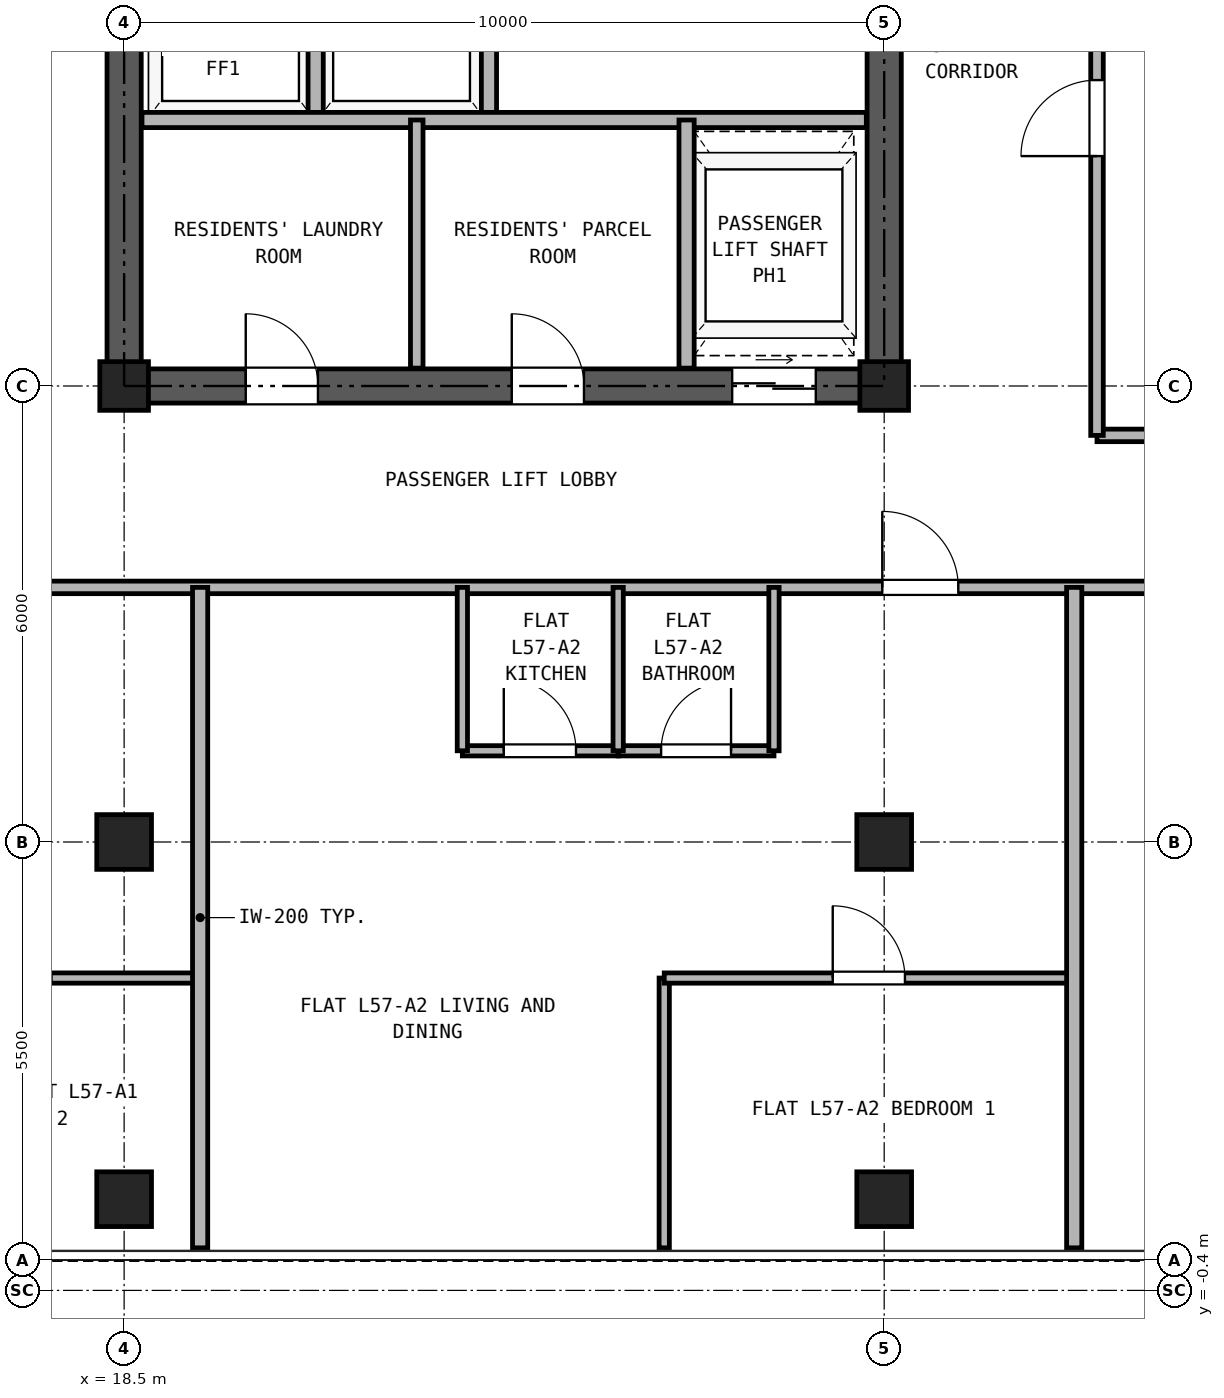
"""IFC4 building model, lengths in metres.
Left out: names, types, materials, properties, quantities, classifications, styles, units other than length and angle.
Written with IfcOpenShell. Run it as: python <this file> out.ifc"""

import sys

from ifc_helpers import new_model, si_unit, direction, frame, frame_2d, origin, origin_2d, place, context, subcontext, project, spatial, rectangle, hollow_rectangle, extrude, source, transform, mapped, element, fill, save


model = new_model("IFC4")
c1 = context("Model", 3, precision=1e-05, world=origin(), true_north=direction((0.0, 1.0)))
c2 = subcontext(c1, "Body", "Model", "MODEL_VIEW")
j1 = project(units=[si_unit("LENGTHUNIT", "METRE"), si_unit("PLANEANGLEUNIT", "RADIAN")], contexts=[c1])
p1 = place(None, origin())
s1 = spatial("IfcSite", under=j1, at=p1, CompositionType="ELEMENT")
p2 = place(p1, origin())
s2 = spatial("IfcBuilding", under=s1, at=p2, CompositionType="ELEMENT")
p3 = place(p2, frame((0.0, 0.0, 202.8)))
s3 = spatial("IfcBuildingStorey", under=s2, at=p3, CompositionType="ELEMENT", Elevation=202.8)
m1 = source(origin(), c2, "Body", "SweptSolid", [
    extrude(hollow_rectangle(XDim=0.72, YDim=0.72, WallThickness=0.04, at=origin_2d()), origin(), (0.0, 0.0, 1.0), 2.95),
])
for number, where, z_axis, x_axis in (
    (1, (18.5, 0.8, 0.0), (0.0, 0.0, 1.0), (1.0, 0.0, 0.0)),
    (2, (28.5, 0.8, 0.0), (0.0, 0.0, 1.0), (1.0, 0.0, 0.0)),
    (3, (18.5, 5.5, 0.0), (0.0, 0.0, 1.0), (1.0, 0.0, 0.0)),
):
    element("IfcColumn", number, at=place(p3, frame(where, z_axis=z_axis, x_axis=x_axis)), inside=s3, PredefinedType="COLUMN", context=c2, shape_type="MappedRepresentation", body=[
        mapped(m1, transform((0.0, 0.0, 0.0), x_axis=(1.0, 0.0, 0.0), y_axis=(0.0, 1.0, 0.0), z_axis=(0.0, 0.0, 1.0), scale=1.0)),
    ])
m2 = source(origin(), c2, "Body", "SweptSolid", [
    extrude(hollow_rectangle(XDim=0.64, YDim=0.64, WallThickness=0.035, at=origin_2d()), origin(), (0.0, 0.0, 1.0), 2.95),
])
p4 = place(p3, frame((18.5, 11.5, 0.0), z_axis=(0.0, 0.0, 1.0), x_axis=(1.0, 0.0, 0.0)))
e4 = element("IfcColumn", 4, at=p4, inside=s3, PredefinedType="COLUMN", context=c2, shape_type="MappedRepresentation", body=[
    mapped(m2, transform((0.0, 0.0, 0.0), x_axis=(1.0, 0.0, 0.0), y_axis=(0.0, 1.0, 0.0), z_axis=(0.0, 0.0, 1.0), scale=1.0)),
])
p5 = place(p3, frame((28.5, 5.5, 0.0), z_axis=(0.0, 0.0, 1.0), x_axis=(1.0, 0.0, 0.0)))
e5 = element("IfcColumn", 5, at=p5, inside=s3, PredefinedType="COLUMN", context=c2, shape_type="MappedRepresentation", body=[
    mapped(m1, transform((0.0, 0.0, 0.0), x_axis=(1.0, 0.0, 0.0), y_axis=(0.0, 1.0, 0.0), z_axis=(0.0, 0.0, 1.0), scale=1.0)),
])
p6 = place(p3, frame((28.5, 11.5, 0.0), z_axis=(0.0, 0.0, 1.0), x_axis=(1.0, 0.0, 0.0)))
e6 = element("IfcColumn", 6, at=p6, inside=s3, PredefinedType="COLUMN", context=c2, shape_type="MappedRepresentation", body=[
    mapped(m2, transform((0.0, 0.0, 0.0), x_axis=(1.0, 0.0, 0.0), y_axis=(0.0, 1.0, 0.0), z_axis=(0.0, 0.0, 1.0), scale=1.0)),
])
p7 = place(p3, frame((18.275, 11.5, 0.0), z_axis=(0.0, 0.0, 1.0), x_axis=(1.0, 0.0, 0.0)))
e7 = element("IfcWall", 7, at=p7, inside=s3, PredefinedType="SHEAR", context=c2, shape_type="SweptSolid", body=[
    extrude(rectangle(XDim=10.45, YDim=0.45, at=frame_2d((5.225, 0.0))), origin(), (0.0, 0.0, 1.0), 2.95),
])
p8 = place(p7, frame((1.825, 0.0, 0.0)))
e8 = element("IfcOpeningElement", 8, at=p8, cuts=e7, PredefinedType="OPENING", context=c2, shape_type="SweptSolid", body=[
    extrude(rectangle(XDim=0.95, YDim=2.15, at=frame_2d((0.475, 1.075))), frame((0.0, 0.235, 0.0), z_axis=(0.0, -1.0, 0.0), x_axis=(1.0, 0.0, 0.0)), (0.0, 0.0, 1.0), 0.47),
])
p9 = place(p7, frame((5.325, 0.0, 0.0)))
e9 = element("IfcOpeningElement", 9, at=p9, cuts=e7, PredefinedType="OPENING", context=c2, shape_type="SweptSolid", body=[
    extrude(rectangle(XDim=0.95, YDim=2.15, at=frame_2d((0.475, 1.075))), frame((0.0, 0.235, 0.0), z_axis=(0.0, -1.0, 0.0), x_axis=(1.0, 0.0, 0.0)), (0.0, 0.0, 1.0), 0.47),
])
p10 = place(p7, frame((8.225, 0.0, 0.0)))
e10 = element("IfcOpeningElement", 10, at=p10, cuts=e7, PredefinedType="OPENING", context=c2, shape_type="SweptSolid", body=[
    extrude(rectangle(XDim=1.1, YDim=2.25, at=frame_2d((0.55, 1.125))), frame((0.0, 0.235, 0.0), z_axis=(0.0, -1.0, 0.0), x_axis=(1.0, 0.0, 0.0)), (0.0, 0.0, 1.0), 0.47),
])
p11 = place(p3, frame((18.5, 11.725, 0.0), z_axis=(0.0, 0.0, 1.0), x_axis=(0.0, 1.0, 0.0)))
e11 = element("IfcWall", 11, at=p11, inside=s3, PredefinedType="SHEAR", context=c2, shape_type="SweptSolid", body=[
    extrude(rectangle(XDim=16.8, YDim=0.45, at=frame_2d((8.4, 0.0))), origin(), (0.0, 0.0, 1.0), 2.95),
])
p12 = place(p11, frame((7.425, 0.0, 0.0)))
e12 = element("IfcOpeningElement", 12, at=p12, cuts=e11, PredefinedType="OPENING", context=c2, shape_type="SweptSolid", body=[
    extrude(rectangle(XDim=1.15, YDim=2.2, at=frame_2d((0.575, 1.1))), frame((0.0, 0.235, 0.0), z_axis=(0.0, -1.0, 0.0), x_axis=(1.0, 0.0, 0.0)), (0.0, 0.0, 1.0), 0.47),
])
p13 = place(p3, frame((28.5, 11.725, 0.0), z_axis=(0.0, 0.0, 1.0), x_axis=(0.0, 1.0, 0.0)))
e13 = element("IfcWall", 13, at=p13, inside=s3, PredefinedType="SHEAR", context=c2, shape_type="SweptSolid", body=[
    extrude(rectangle(XDim=16.8, YDim=0.45, at=frame_2d((8.4, 0.0))), origin(), (0.0, 0.0, 1.0), 2.95),
])
p14 = place(p13, frame((7.425, 0.0, 0.0)))
e14 = element("IfcOpeningElement", 14, at=p14, cuts=e13, PredefinedType="OPENING", context=c2, shape_type="SweptSolid", body=[
    extrude(rectangle(XDim=1.15, YDim=2.2, at=frame_2d((0.575, 1.1))), frame((0.0, 0.235, 0.0), z_axis=(0.0, -1.0, 0.0), x_axis=(1.0, 0.0, 0.0)), (0.0, 0.0, 1.0), 0.47),
])
for number, where, z_axis, x_axis in (
    (15, (21.02, 15.0, 0.0), (0.0, 0.0, 1.0), (0.0, 1.0, 0.0)),
    (16, (23.3, 15.0, 0.0), (0.0, 0.0, 1.0), (0.0, 1.0, 0.0)),
):
    element("IfcWall", number, at=place(p3, frame(where, z_axis=z_axis, x_axis=x_axis)), inside=s3, PredefinedType="PARTITIONING", context=c2, shape_type="SweptSolid", body=[
        extrude(rectangle(XDim=3.0, YDim=0.2, at=frame_2d((1.5, 0.0))), origin(), (0.0, 0.0, 1.0), 2.95),
    ])
p15 = place(p3, frame((18.735, 15.0, 0.0), z_axis=(0.0, 0.0, 1.0), x_axis=(1.0, 0.0, 0.0)))
e17 = element("IfcWall", 17, at=p15, inside=s3, PredefinedType="PARTITIONING", context=c2, shape_type="SweptSolid", body=[
    extrude(rectangle(XDim=9.53, YDim=0.2, at=frame_2d((4.765, 0.0))), origin(), (0.0, 0.0, 1.0), 2.95),
])
p16 = place(p3, frame((22.35, 11.735, 0.0), z_axis=(0.0, 0.0, 1.0), x_axis=(0.0, 1.0, 0.0)))
e18 = element("IfcWall", 18, at=p16, inside=s3, PredefinedType="PARTITIONING", context=c2, shape_type="SweptSolid", body=[
    extrude(rectangle(XDim=3.265, YDim=0.165, at=frame_2d((1.632, 0.0))), origin(), (0.0, 0.0, 1.0), 2.95),
])
p17 = place(p3, frame((25.9, 11.735, 0.0), z_axis=(0.0, 0.0, 1.0), x_axis=(0.0, 1.0, 0.0)))
e19 = element("IfcWall", 19, at=p17, inside=s3, PredefinedType="PARTITIONING", context=c2, shape_type="SweptSolid", body=[
    extrude(rectangle(XDim=3.265, YDim=0.2, at=frame_2d((1.632, 0.0))), origin(), (0.0, 0.0, 1.0), 2.95),
])
p18 = place(p3, frame((0.16, 8.85, 0.0), z_axis=(0.0, 0.0, 1.0), x_axis=(1.0, 0.0, 0.0)))
e20 = element("IfcWall", 20, at=p18, inside=s3, PredefinedType="PARTITIONING", context=c2, shape_type="SweptSolid", body=[
    extrude(rectangle(XDim=41.48, YDim=0.165, at=frame_2d((20.74, 0.0))), origin(), (0.0, 0.0, 1.0), 2.95),
])
p19 = place(p18, frame((14.815, 0.0, 0.0)))
e21 = element("IfcOpeningElement", 21, at=p19, cuts=e20, PredefinedType="OPENING", context=c2, shape_type="SweptSolid", body=[
    extrude(rectangle(XDim=1.0, YDim=2.15, at=frame_2d((0.5, 1.075))), frame((0.0, 0.093, 0.0), z_axis=(0.0, -1.0, 0.0), x_axis=(1.0, 0.0, 0.0)), (0.0, 0.0, 1.0), 0.185),
])
p20 = place(p18, frame((28.315, 0.0, 0.0)))
e22 = element("IfcOpeningElement", 22, at=p20, cuts=e20, PredefinedType="OPENING", context=c2, shape_type="SweptSolid", body=[
    extrude(rectangle(XDim=1.0, YDim=2.15, at=frame_2d((0.5, 1.075))), frame((0.0, 0.093, 0.0), z_axis=(0.0, -1.0, 0.0), x_axis=(1.0, 0.0, 0.0)), (0.0, 0.0, 1.0), 0.185),
])
p21 = place(p18, frame((32.615, 0.0, 0.0)))
e23 = element("IfcOpeningElement", 23, at=p21, cuts=e20, PredefinedType="OPENING", context=c2, shape_type="SweptSolid", body=[
    extrude(rectangle(XDim=1.0, YDim=2.15, at=frame_2d((0.5, 1.075))), frame((0.0, 0.093, 0.0), z_axis=(0.0, -1.0, 0.0), x_axis=(1.0, 0.0, 0.0)), (0.0, 0.0, 1.0), 0.185),
])
p22 = place(p3, frame((31.3, 10.85, 0.0), z_axis=(0.0, 0.0, 1.0), x_axis=(1.0, 0.0, 0.0)))
e24 = element("IfcWall", 24, at=p22, inside=s3, PredefinedType="PARTITIONING", context=c2, shape_type="SweptSolid", body=[
    extrude(rectangle(XDim=6.9, YDim=0.165, at=frame_2d((3.45, 0.0))), origin(), (0.0, 0.0, 1.0), 2.95),
])
p23 = place(p3, frame((31.3, 10.85, 0.0), z_axis=(0.0, 0.0, 1.0), x_axis=(0.0, 1.0, 0.0)))
e25 = element("IfcWall", 25, at=p23, inside=s3, PredefinedType="PARTITIONING", context=c2, shape_type="SweptSolid", body=[
    extrude(rectangle(XDim=24.29, YDim=0.165, at=frame_2d((12.145, 0.0))), origin(), (0.0, 0.0, 1.0), 2.95),
])
p24 = place(p23, frame((3.675, 0.0, 0.0)))
e26 = element("IfcOpeningElement", 26, at=p24, cuts=e25, PredefinedType="OPENING", context=c2, shape_type="SweptSolid", body=[
    extrude(rectangle(XDim=1.0, YDim=2.15, at=frame_2d((0.5, 1.075))), frame((0.0, 0.093, 0.0), z_axis=(0.0, -1.0, 0.0), x_axis=(1.0, 0.0, 0.0)), (0.0, 0.0, 1.0), 0.185),
])
p25 = place(p23, frame((11.95, 0.0, 0.0)))
e27 = element("IfcOpeningElement", 27, at=p25, cuts=e25, PredefinedType="OPENING", context=c2, shape_type="SweptSolid", body=[
    extrude(rectangle(XDim=1.0, YDim=2.15, at=frame_2d((0.5, 1.075))), frame((0.0, 0.093, 0.0), z_axis=(0.0, -1.0, 0.0), x_axis=(1.0, 0.0, 0.0)), (0.0, 0.0, 1.0), 0.185),
])
p26 = place(p23, frame((17.75, 0.0, 0.0)))
e28 = element("IfcOpeningElement", 28, at=p26, cuts=e25, PredefinedType="OPENING", context=c2, shape_type="SweptSolid", body=[
    extrude(rectangle(XDim=1.0, YDim=2.15, at=frame_2d((0.5, 1.075))), frame((0.0, 0.093, 0.0), z_axis=(0.0, -1.0, 0.0), x_axis=(1.0, 0.0, 0.0)), (0.0, 0.0, 1.0), 0.185),
])
p27 = place(p3, frame((14.648, 3.71, 0.0), z_axis=(0.0, 0.0, 1.0), x_axis=(1.0, 0.0, 0.0)))
e29 = element("IfcWall", 29, at=p27, inside=s3, PredefinedType="PARTITIONING", context=c2, shape_type="SweptSolid", body=[
    extrude(rectangle(XDim=4.852, YDim=0.135, at=frame_2d((2.426, 0.0))), origin(), (0.0, 0.0, 1.0), 2.95),
])
p28 = place(p27, frame((1.946, 0.0, 0.0)))
e30 = element("IfcOpeningElement", 30, at=p28, cuts=e29, PredefinedType="OPENING", context=c2, shape_type="SweptSolid", body=[
    extrude(rectangle(XDim=0.95, YDim=2.15, at=frame_2d((0.475, 1.075))), frame((0.0, 0.077, 0.0), z_axis=(0.0, -1.0, 0.0), x_axis=(1.0, 0.0, 0.0)), (0.0, 0.0, 1.0), 0.155),
])
p29 = place(p3, frame((19.5, 0.16, 0.0), z_axis=(0.0, 0.0, 1.0), x_axis=(0.0, 1.0, 0.0)))
e31 = element("IfcWall", 31, at=p29, inside=s3, PredefinedType="PARTITIONING", context=c2, shape_type="SweptSolid", body=[
    extrude(rectangle(XDim=8.69, YDim=0.2, at=frame_2d((4.345, 0.0))), origin(), (0.0, 0.0, 1.0), 2.95),
])
p30 = place(p3, frame((22.95, 6.7, 0.0), z_axis=(0.0, 0.0, 1.0), x_axis=(1.0, 0.0, 0.0)))
e32 = element("IfcWall", 32, at=p30, inside=s3, PredefinedType="PARTITIONING", context=c2, shape_type="SweptSolid", body=[
    extrude(rectangle(XDim=2.05, YDim=0.135, at=frame_2d((1.025, 0.0))), origin(), (0.0, 0.0, 1.0), 2.95),
])
p31 = place(p30, frame((0.545, 0.0, 0.0)))
e33 = element("IfcOpeningElement", 33, at=p31, cuts=e32, PredefinedType="OPENING", context=c2, shape_type="SweptSolid", body=[
    extrude(rectangle(XDim=0.95, YDim=2.15, at=frame_2d((0.475, 1.075))), frame((0.0, 0.077, 0.0), z_axis=(0.0, -1.0, 0.0), x_axis=(1.0, 0.0, 0.0)), (0.0, 0.0, 1.0), 0.155),
])
p32 = place(p3, frame((25.0, 6.7, 0.0), z_axis=(0.0, 0.0, 1.0), x_axis=(1.0, 0.0, 0.0)))
e34 = element("IfcWall", 34, at=p32, inside=s3, PredefinedType="PARTITIONING", context=c2, shape_type="SweptSolid", body=[
    extrude(rectangle(XDim=2.05, YDim=0.135, at=frame_2d((1.025, 0.0))), origin(), (0.0, 0.0, 1.0), 2.95),
])
p33 = place(p32, frame((0.565, 0.0, 0.0)))
e35 = element("IfcOpeningElement", 35, at=p33, cuts=e34, PredefinedType="OPENING", context=c2, shape_type="SweptSolid", body=[
    extrude(rectangle(XDim=0.92, YDim=2.1, at=frame_2d((0.46, 1.05))), frame((0.0, 0.077, 0.0), z_axis=(0.0, -1.0, 0.0), x_axis=(1.0, 0.0, 0.0)), (0.0, 0.0, 1.0), 0.155),
])
for number, where, z_axis, x_axis in (
    (36, (22.95, 6.7, 0.0), (0.0, 0.0, 1.0), (0.0, 1.0, 0.0)),
    (37, (25.0, 6.7, 0.0), (0.0, 0.0, 1.0), (0.0, 1.0, 0.0)),
    (38, (27.05, 6.7, 0.0), (0.0, 0.0, 1.0), (0.0, 1.0, 0.0)),
):
    element("IfcWall", number, at=place(p3, frame(where, z_axis=z_axis, x_axis=x_axis)), inside=s3, PredefinedType="PARTITIONING", context=c2, shape_type="SweptSolid", body=[
        extrude(rectangle(XDim=2.15, YDim=0.135, at=frame_2d((1.075, 0.0))), origin(), (0.0, 0.0, 1.0), 2.95),
    ])
p34 = place(p3, frame((25.606, 0.16, 0.0), z_axis=(0.0, 0.0, 1.0), x_axis=(0.0, 1.0, 0.0)))
e39 = element("IfcWall", 39, at=p34, inside=s3, PredefinedType="PARTITIONING", context=c2, shape_type="SweptSolid", body=[
    extrude(rectangle(XDim=3.55, YDim=0.135, at=frame_2d((1.775, 0.0))), origin(), (0.0, 0.0, 1.0), 2.95),
])
p35 = place(p3, frame((25.606, 3.71, 0.0), z_axis=(0.0, 0.0, 1.0), x_axis=(1.0, 0.0, 0.0)))
e40 = element("IfcWall", 40, at=p35, inside=s3, PredefinedType="PARTITIONING", context=c2, shape_type="SweptSolid", body=[
    extrude(rectangle(XDim=5.394, YDim=0.135, at=frame_2d((2.697, 0.0))), origin(), (0.0, 0.0, 1.0), 2.95),
])
p36 = place(p35, frame((2.217, 0.0, 0.0)))
e41 = element("IfcOpeningElement", 41, at=p36, cuts=e40, PredefinedType="OPENING", context=c2, shape_type="SweptSolid", body=[
    extrude(rectangle(XDim=0.95, YDim=2.15, at=frame_2d((0.475, 1.075))), frame((0.0, 0.077, 0.0), z_axis=(0.0, -1.0, 0.0), x_axis=(1.0, 0.0, 0.0)), (0.0, 0.0, 1.0), 0.155),
])
p37 = place(p3, frame((31.0, 0.16, 0.0), z_axis=(0.0, 0.0, 1.0), x_axis=(0.0, 1.0, 0.0)))
e42 = element("IfcWall", 42, at=p37, inside=s3, PredefinedType="PARTITIONING", context=c2, shape_type="SweptSolid", body=[
    extrude(rectangle(XDim=8.69, YDim=0.2, at=frame_2d((4.345, 0.0))), origin(), (0.0, 0.0, 1.0), 2.95),
])
p38 = place(p8, frame((0.95, 0.0, 0.0), z_axis=(0.0, 0.0, 1.0), x_axis=(-1.0, 0.0, 0.0)))
e43 = element("IfcDoor", 43, at=p38, inside=s3, OperationType="SINGLE_SWING_LEFT", PredefinedType="DOOR", context=c2, shape_type="SweptSolid", body=[
    extrude(rectangle(XDim=0.95, YDim=2.15, at=frame_2d((0.475, 1.075))), frame((0.0, 0.025, 0.0), z_axis=(0.0, -1.0, 0.0), x_axis=(1.0, 0.0, 0.0)), (0.0, 0.0, 1.0), 0.05),
])
fill(e8, e43)
p39 = place(p9, frame((0.95, 0.0, 0.0), z_axis=(0.0, 0.0, 1.0), x_axis=(-1.0, 0.0, 0.0)))
e44 = element("IfcDoor", 44, at=p39, inside=s3, OperationType="SINGLE_SWING_LEFT", PredefinedType="DOOR", context=c2, shape_type="SweptSolid", body=[
    extrude(rectangle(XDim=0.95, YDim=2.15, at=frame_2d((0.475, 1.075))), frame((0.0, 0.025, 0.0), z_axis=(0.0, -1.0, 0.0), x_axis=(1.0, 0.0, 0.0)), (0.0, 0.0, 1.0), 0.05),
])
fill(e9, e44)
p40 = place(p10, frame((1.1, 0.0, 0.0), z_axis=(0.0, 0.0, 1.0), x_axis=(-1.0, 0.0, 0.0)))
e45 = element("IfcDoor", 45, at=p40, inside=s3, OperationType="DOUBLE_DOOR_SLIDING", PredefinedType="DOOR", context=c2, shape_type="SweptSolid", body=[
    extrude(rectangle(XDim=1.1, YDim=2.25, at=frame_2d((0.55, 1.125))), frame((0.0, 0.025, 0.0), z_axis=(0.0, -1.0, 0.0), x_axis=(1.0, 0.0, 0.0)), (0.0, 0.0, 1.0), 0.05),
])
fill(e10, e45)
p41 = place(p31, origin())
e46 = element("IfcDoor", 46, at=p41, inside=s3, OperationType="SINGLE_SWING_LEFT", PredefinedType="DOOR", context=c2, shape_type="SweptSolid", body=[
    extrude(rectangle(XDim=0.95, YDim=2.15, at=frame_2d((0.475, 1.075))), frame((0.0, 0.025, 0.0), z_axis=(0.0, -1.0, 0.0), x_axis=(1.0, 0.0, 0.0)), (0.0, 0.0, 1.0), 0.05),
])
fill(e33, e46)
p42 = place(p33, origin())
e47 = element("IfcDoor", 47, at=p42, inside=s3, OperationType="SINGLE_SWING_RIGHT", PredefinedType="DOOR", context=c2, shape_type="SweptSolid", body=[
    extrude(rectangle(XDim=0.92, YDim=2.1, at=frame_2d((0.46, 1.05))), frame((0.0, 0.025, 0.0), z_axis=(0.0, -1.0, 0.0), x_axis=(1.0, 0.0, 0.0)), (0.0, 0.0, 1.0), 0.05),
])
fill(e35, e47)
p43 = place(p36, frame((0.95, 0.0, 0.0), z_axis=(0.0, 0.0, 1.0), x_axis=(-1.0, 0.0, 0.0)))
e48 = element("IfcDoor", 48, at=p43, inside=s3, OperationType="SINGLE_SWING_LEFT", PredefinedType="DOOR", context=c2, shape_type="SweptSolid", body=[
    extrude(rectangle(XDim=0.95, YDim=2.15, at=frame_2d((0.475, 1.075))), frame((0.0, 0.025, 0.0), z_axis=(0.0, -1.0, 0.0), x_axis=(1.0, 0.0, 0.0)), (0.0, 0.0, 1.0), 0.05),
])
fill(e41, e48)
p44 = place(p20, frame((1.0, 0.0, 0.0), z_axis=(0.0, 0.0, 1.0), x_axis=(-1.0, 0.0, 0.0)))
e49 = element("IfcDoor", 49, at=p44, inside=s3, OperationType="SINGLE_SWING_LEFT", PredefinedType="DOOR", context=c2, shape_type="SweptSolid", body=[
    extrude(rectangle(XDim=1.0, YDim=2.15, at=frame_2d((0.5, 1.075))), frame((0.0, 0.025, 0.0), z_axis=(0.0, -1.0, 0.0), x_axis=(1.0, 0.0, 0.0)), (0.0, 0.0, 1.0), 0.05),
])
fill(e22, e49)
p45 = place(p24, frame((1.0, 0.0, 0.0), z_axis=(0.0, 0.0, 1.0), x_axis=(-1.0, 0.0, 0.0)))
e50 = element("IfcDoor", 50, at=p45, inside=s3, OperationType="SINGLE_SWING_LEFT", PredefinedType="DOOR", context=c2, shape_type="SweptSolid", body=[
    extrude(rectangle(XDim=1.0, YDim=2.15, at=frame_2d((0.5, 1.075))), frame((0.0, 0.025, 0.0), z_axis=(0.0, -1.0, 0.0), x_axis=(1.0, 0.0, 0.0)), (0.0, 0.0, 1.0), 0.05),
])
fill(e26, e50)
save(model, sys.argv[1])
